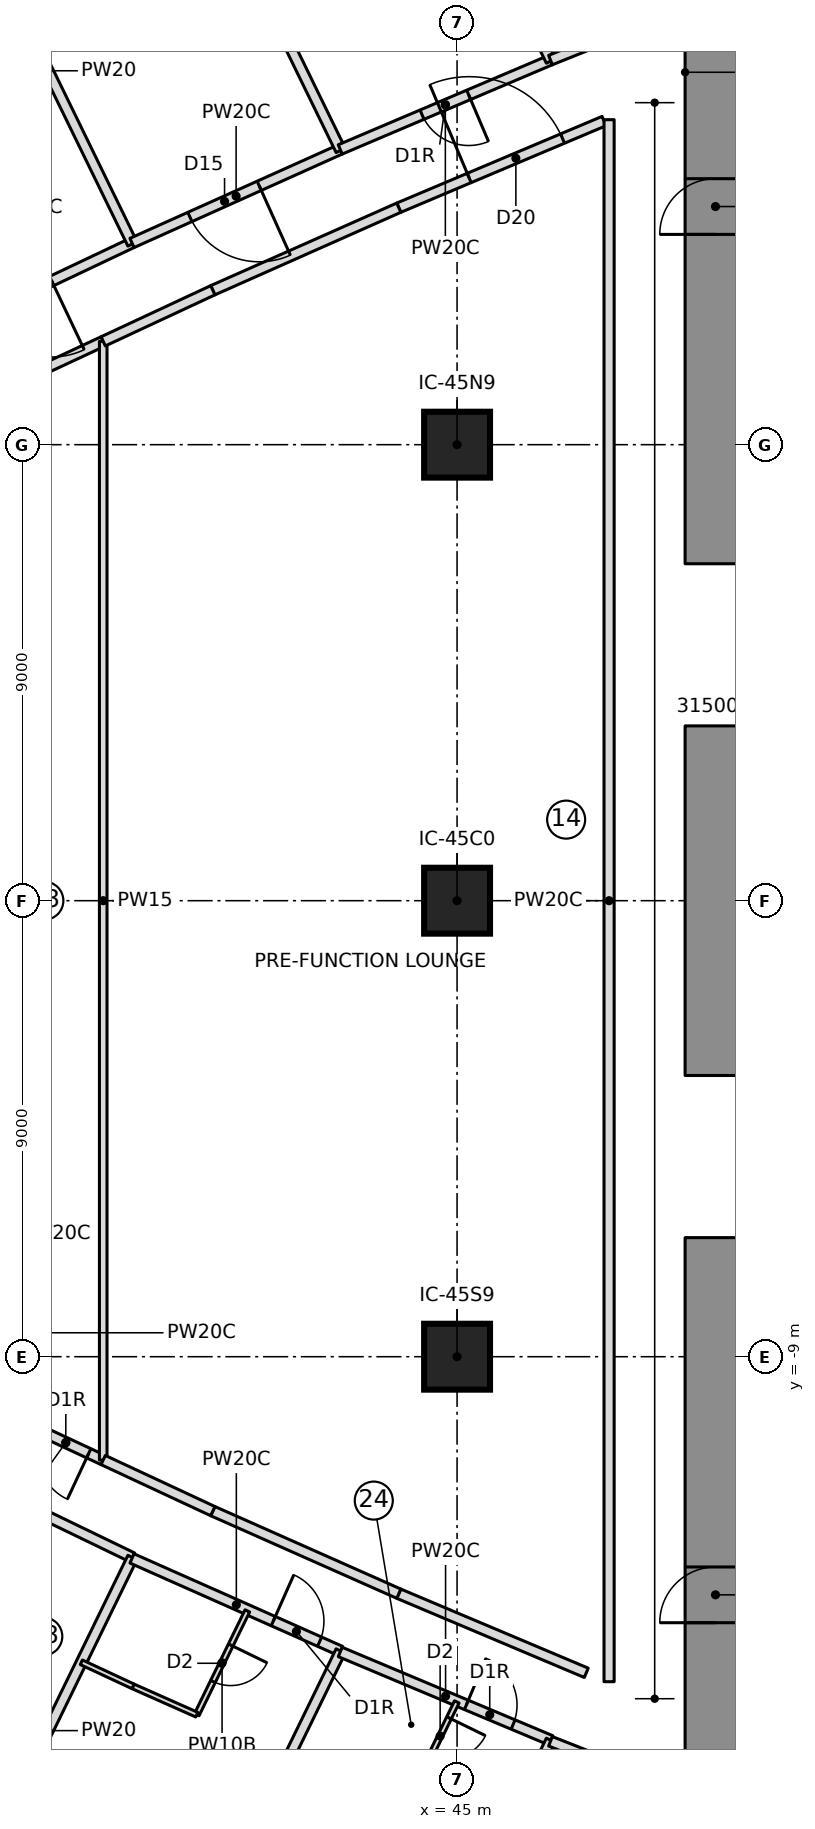
"""IFC4 building model, lengths in metres.
Left out: names, types, materials, properties, quantities, classifications, styles, units other than length and angle.
Written with IfcOpenShell. Run it as: python <this file> out.ifc"""

import sys

from ifc_helpers import new_model, si_unit, direction, frame, frame_2d, origin, origin_2d, place, context, subcontext, project, spatial, rectangle, extrude, element, fill, save


model = new_model("IFC4")
c1 = context("Model", 3, precision=1e-05, world=origin(), true_north=direction((0.0, 1.0)))
c2 = subcontext(c1, "Body", "Model", "MODEL_VIEW")
j1 = project(units=[si_unit("LENGTHUNIT", "METRE"), si_unit("PLANEANGLEUNIT", "RADIAN")], contexts=[c1])
p1 = place(None, origin())
s1 = spatial("IfcSite", under=j1, at=p1, CompositionType="ELEMENT")
p2 = place(p1, origin())
s2 = spatial("IfcBuilding", under=s1, at=p2, CompositionType="ELEMENT")
p3 = place(p2, frame((0.0, 0.0, 46.7)))
s3 = spatial("IfcBuildingStorey", under=s2, at=p3, CompositionType="ELEMENT", Elevation=46.7)
p4 = place(p3, frame((50.1, 6.65, 0.0), z_axis=(0.0, 0.0, 1.0), x_axis=(0.0, 1.0, 0.0)))
e1 = element("IfcWall", 1, at=p4, inside=s3, PredefinedType="SHEAR", context=c2, shape_type="SweptSolid", body=[
    extrude(rectangle(XDim=10.3, YDim=1.2, at=frame_2d((5.15, 0.0))), origin(), (0.0, 0.0, 1.0), 3.55),
])
p5 = place(p4, frame((6.5, 0.0, 0.0)))
e2 = element("IfcOpeningElement", 2, at=p5, cuts=e1, PredefinedType="OPENING", context=c2, shape_type="SweptSolid", body=[
    extrude(rectangle(XDim=1.1, YDim=2.1, at=frame_2d((0.55, 1.05))), frame((0.0, 0.61, 0.0), z_axis=(0.0, -1.0, 0.0), x_axis=(1.0, 0.0, 0.0)), (0.0, 0.0, 1.0), 1.22),
])
p6 = place(p3, frame((50.1, -3.45, 0.0), z_axis=(0.0, 0.0, 1.0), x_axis=(0.0, 1.0, 0.0)))
e3 = element("IfcWall", 3, at=p6, inside=s3, PredefinedType="SHEAR", context=c2, shape_type="SweptSolid", body=[
    extrude(rectangle(XDim=6.9, YDim=1.2, at=frame_2d((3.45, 0.0))), origin(), (0.0, 0.0, 1.0), 3.55),
])
p7 = place(p3, frame((50.1, -16.95, 0.0), z_axis=(0.0, 0.0, 1.0), x_axis=(0.0, 1.0, 0.0)))
e4 = element("IfcWall", 4, at=p7, inside=s3, PredefinedType="SHEAR", context=c2, shape_type="SweptSolid", body=[
    extrude(rectangle(XDim=10.3, YDim=1.2, at=frame_2d((5.15, 0.0))), origin(), (0.0, 0.0, 1.0), 3.55),
])
p8 = place(p7, frame((2.7, 0.0, 0.0)))
e5 = element("IfcOpeningElement", 5, at=p8, cuts=e4, PredefinedType="OPENING", context=c2, shape_type="SweptSolid", body=[
    extrude(rectangle(XDim=1.1, YDim=2.1, at=frame_2d((0.55, 1.05))), frame((0.0, 0.61, 0.0), z_axis=(0.0, -1.0, 0.0), x_axis=(1.0, 0.0, 0.0)), (0.0, 0.0, 1.0), 1.22),
])
for number, where, z_axis, x_axis in (
    (6, (45.0, -9.0, 0.0), (0.0, 0.0, 1.0), (1.0, 0.0, 0.0)),
    (7, (45.0, 0.0, 0.0), (0.0, 0.0, 1.0), (1.0, 0.0, 0.0)),
    (8, (45.0, 9.0, 0.0), (0.0, 0.0, 1.0), (1.0, 0.0, 0.0)),
):
    element("IfcColumn", number, at=place(p3, frame(where, z_axis=z_axis, x_axis=x_axis)), inside=s3, PredefinedType="COLUMN", context=c2, shape_type="SweptSolid", body=[
        extrude(rectangle(XDim=1.3, YDim=1.3, at=origin_2d()), origin(), (0.0, 0.0, 1.0), 3.55),
    ])
p9 = place(p3, frame((38.585, 12.981, 0.0), z_axis=(0.0, 0.0, 1.0), x_axis=(-0.903706948966, -0.428151550727, 0.0)))
e9 = element("IfcWall", 9, at=p9, inside=s3, PredefinedType="PARTITIONING", context=c2, shape_type="SweptSolid", body=[
    extrude(rectangle(XDim=4.506, YDim=0.2, at=frame_2d((2.253, 0.0))), origin(), (0.0, 0.0, 1.0), 3.25),
])
p10 = place(p9, frame((1.753, 0.0, 0.0)))
e10 = element("IfcOpeningElement", 10, at=p10, cuts=e9, PredefinedType="OPENING", context=c2, shape_type="SweptSolid", body=[
    extrude(rectangle(XDim=1.5, YDim=2.1, at=frame_2d((0.75, 1.05))), frame((0.0, 0.11, 0.0), z_axis=(0.0, -1.0, 0.0), x_axis=(1.0, 0.0, 0.0)), (0.0, 0.0, 1.0), 0.22),
])
p11 = place(p3, frame((38.594, 12.963, 0.0), z_axis=(0.0, 0.0, 1.0), x_axis=(-0.438197705697, 0.898878618459, 0.0)))
e11 = element("IfcWall", 11, at=p11, inside=s3, PredefinedType="PARTITIONING", context=c2, shape_type="SweptSolid", body=[
    extrude(rectangle(XDim=7.601, YDim=0.2, at=frame_2d((3.801, 0.0))), origin(), (0.0, 0.0, 1.0), 3.25),
])
p12 = place(p3, frame((42.694, 14.827, 0.0), z_axis=(0.0, 0.0, 1.0), x_axis=(-0.912193063794, -0.409760679381, 0.0)))
e12 = element("IfcWall", 12, at=p12, inside=s3, PredefinedType="PARTITIONING", context=c2, shape_type="SweptSolid", body=[
    extrude(rectangle(XDim=4.505, YDim=0.2, at=frame_2d((2.252, 0.0))), origin(), (0.0, 0.0, 1.0), 3.25),
])
p13 = place(p12, frame((1.752, 0.0, 0.0)))
e13 = element("IfcOpeningElement", 13, at=p13, cuts=e12, PredefinedType="OPENING", context=c2, shape_type="SweptSolid", body=[
    extrude(rectangle(XDim=1.5, YDim=2.1, at=frame_2d((0.75, 1.05))), frame((0.0, 0.11, 0.0), z_axis=(0.0, -1.0, 0.0), x_axis=(1.0, 0.0, 0.0)), (0.0, 0.0, 1.0), 0.22),
])
p14 = place(p3, frame((42.703, 14.809, 0.0), z_axis=(0.0, 0.0, 1.0), x_axis=(-0.438202247191, 0.898876404494, 0.0)))
e14 = element("IfcWall", 14, at=p14, inside=s3, PredefinedType="PARTITIONING", context=c2, shape_type="SweptSolid", body=[
    extrude(rectangle(XDim=7.605, YDim=0.2, at=frame_2d((3.802, 0.0))), origin(), (0.0, 0.0, 1.0), 3.25),
])
p15 = place(p3, frame((46.844, 16.591, 0.0), z_axis=(0.0, 0.0, 1.0), x_axis=(-0.92031727314, -0.39117274542, 0.0)))
e15 = element("IfcWall", 15, at=p15, inside=s3, PredefinedType="PARTITIONING", context=c2, shape_type="SweptSolid", body=[
    extrude(rectangle(XDim=4.509, YDim=0.2, at=frame_2d((2.254, 0.0))), origin(), (0.0, 0.0, 1.0), 3.25),
])
p16 = place(p15, frame((1.754, 0.0, 0.0)))
e16 = element("IfcOpeningElement", 16, at=p16, cuts=e15, PredefinedType="OPENING", context=c2, shape_type="SweptSolid", body=[
    extrude(rectangle(XDim=1.0, YDim=2.1, at=frame_2d((0.5, 1.05))), frame((0.0, 0.11, 0.0), z_axis=(0.0, -1.0, 0.0), x_axis=(1.0, 0.0, 0.0)), (0.0, 0.0, 1.0), 0.22),
])
p17 = place(p3, frame((46.852, 16.573, 0.0), z_axis=(0.0, 0.0, 1.0), x_axis=(-0.438196739796, 0.898879089328, 0.0)))
e17 = element("IfcWall", 17, at=p17, inside=s3, PredefinedType="PARTITIONING", context=c2, shape_type="SweptSolid", body=[
    extrude(rectangle(XDim=7.611, YDim=0.2, at=frame_2d((3.806, 0.0))), origin(), (0.0, 0.0, 1.0), 3.25),
])
p18 = place(p3, frame((30.48, -9.04, 0.0), z_axis=(0.0, 0.0, 1.0), x_axis=(0.900265089934, -0.43534212735, 0.0)))
e18 = element("IfcWall", 18, at=p18, inside=s3, PredefinedType="PARTITIONING", context=c2, shape_type="SweptSolid", body=[
    extrude(rectangle(XDim=9.013, YDim=0.2, at=frame_2d((4.506, 0.0))), origin(), (0.0, 0.0, 1.0), 3.25),
])
p19 = place(p18, frame((3.9, 0.0, 0.0)))
e19 = element("IfcOpeningElement", 19, at=p19, cuts=e18, PredefinedType="OPENING", context=c2, shape_type="SweptSolid", body=[
    extrude(rectangle(XDim=1.0, YDim=2.1, at=frame_2d((0.5, 1.05))), frame((0.0, 0.11, 0.0), z_axis=(0.0, -1.0, 0.0), x_axis=(1.0, 0.0, 0.0)), (0.0, 0.0, 1.0), 0.22),
])
p20 = place(p3, frame((35.263, -19.796, 0.0), z_axis=(0.0, 0.0, 1.0), x_axis=(0.438197705697, 0.898878618459, 0.0)))
e20 = element("IfcWall", 20, at=p20, inside=s3, PredefinedType="PARTITIONING", context=c2, shape_type="SweptSolid", body=[
    extrude(rectangle(XDim=7.601, YDim=0.2, at=frame_2d((3.801, 0.0))), origin(), (0.0, 0.0, 1.0), 3.25),
])
p21 = place(p3, frame((38.585, -12.981, 0.0), z_axis=(0.0, 0.0, 1.0), x_axis=(0.914010307464, -0.40569096348, 0.0)))
e21 = element("IfcWall", 21, at=p21, inside=s3, PredefinedType="PARTITIONING", context=c2, shape_type="SweptSolid", body=[
    extrude(rectangle(XDim=4.506, YDim=0.2, at=frame_2d((2.253, 0.0))), origin(), (0.0, 0.0, 1.0), 3.25),
])
p22 = place(p21, frame((3.05, 0.0, 0.0)))
e22 = element("IfcOpeningElement", 22, at=p22, cuts=e21, PredefinedType="OPENING", context=c2, shape_type="SweptSolid", body=[
    extrude(rectangle(XDim=1.0, YDim=2.1, at=frame_2d((0.5, 1.05))), frame((0.0, 0.11, 0.0), z_axis=(0.0, -1.0, 0.0), x_axis=(1.0, 0.0, 0.0)), (0.0, 0.0, 1.0), 0.22),
])
p23 = place(p3, frame((40.861, -14.017, 0.0), z_axis=(0.0, 0.0, 1.0), x_axis=(-0.438233629628, -0.898861104878, 0.0)))
e23 = element("IfcWall", 23, at=p23, inside=s3, PredefinedType="PARTITIONING", context=c2, shape_type="SweptSolid", body=[
    extrude(rectangle(XDim=2.279, YDim=0.1, at=frame_2d((1.139, 0.0))), origin(), (0.0, 0.0, 1.0), 3.25),
])
p24 = place(p23, frame((0.75, 0.0, 0.0)))
e24 = element("IfcOpeningElement", 24, at=p24, cuts=e23, PredefinedType="OPENING", context=c2, shape_type="SweptSolid", body=[
    extrude(rectangle(XDim=0.8, YDim=2.1, at=frame_2d((0.4, 1.05))), frame((0.0, 0.06, 0.0), z_axis=(0.0, -1.0, 0.0), x_axis=(1.0, 0.0, 0.0)), (0.0, 0.0, 1.0), 0.12),
])
p25 = place(p3, frame((39.863, -16.065, 0.0), z_axis=(0.0, 0.0, 1.0), x_axis=(-0.913972512123, 0.405776104625, 0.0)))
e25 = element("IfcWall", 25, at=p25, inside=s3, PredefinedType="PARTITIONING", context=c2, shape_type="SweptSolid", body=[
    extrude(rectangle(XDim=1.375, YDim=0.1, at=frame_2d((0.688, 0.0))), origin(), (0.0, 0.0, 1.0), 3.25),
])
p26 = place(p3, frame((38.606, -15.507, 0.0), z_axis=(0.0, 0.0, 1.0), x_axis=(-0.90632717857, 0.422576673972, 0.0)))
e26 = element("IfcWall", 26, at=p26, inside=s3, PredefinedType="PARTITIONING", context=c2, shape_type="SweptSolid", body=[
    extrude(rectangle(XDim=1.125, YDim=0.1, at=frame_2d((0.563, 0.0))), origin(), (0.0, 0.0, 1.0), 3.25),
])
p27 = place(p3, frame((39.37, -21.645, 0.0), z_axis=(0.0, 0.0, 1.0), x_axis=(0.438202247191, 0.898876404494, 0.0)))
e27 = element("IfcWall", 27, at=p27, inside=s3, PredefinedType="PARTITIONING", context=c2, shape_type="SweptSolid", body=[
    extrude(rectangle(XDim=7.605, YDim=0.2, at=frame_2d((3.802, 0.0))), origin(), (0.0, 0.0, 1.0), 3.25),
])
p28 = place(p3, frame((42.694, -14.827, 0.0), z_axis=(0.0, 0.0, 1.0), x_axis=(0.922040468003, -0.38709349693, 0.0)))
e28 = element("IfcWall", 28, at=p28, inside=s3, PredefinedType="PARTITIONING", context=c2, shape_type="SweptSolid", body=[
    extrude(rectangle(XDim=4.51, YDim=0.2, at=frame_2d((2.255, 0.0))), origin(), (0.0, 0.0, 1.0), 3.25),
])
p29 = place(p28, frame((2.7, 0.0, 0.0)))
e29 = element("IfcOpeningElement", 29, at=p29, cuts=e28, PredefinedType="OPENING", context=c2, shape_type="SweptSolid", body=[
    extrude(rectangle(XDim=1.0, YDim=2.1, at=frame_2d((0.5, 1.05))), frame((0.0, 0.11, 0.0), z_axis=(0.0, -1.0, 0.0), x_axis=(1.0, 0.0, 0.0)), (0.0, 0.0, 1.0), 0.22),
])
p30 = place(p3, frame((44.994, -15.813, 0.0), z_axis=(0.0, 0.0, 1.0), x_axis=(-0.438197922062, -0.898878512982, 0.0)))
e30 = element("IfcWall", 30, at=p30, inside=s3, PredefinedType="PARTITIONING", context=c2, shape_type="SweptSolid", body=[
    extrude(rectangle(XDim=2.281, YDim=0.1, at=frame_2d((1.14, 0.0))), origin(), (0.0, 0.0, 1.0), 3.25),
])
p31 = place(p30, frame((0.35, 0.0, 0.0)))
e31 = element("IfcOpeningElement", 31, at=p31, cuts=e30, PredefinedType="OPENING", context=c2, shape_type="SweptSolid", body=[
    extrude(rectangle(XDim=0.8, YDim=2.1, at=frame_2d((0.4, 1.05))), frame((0.0, 0.06, 0.0), z_axis=(0.0, -1.0, 0.0), x_axis=(1.0, 0.0, 0.0)), (0.0, 0.0, 1.0), 0.12),
])
p32 = place(p3, frame((43.517, -23.414, 0.0), z_axis=(0.0, 0.0, 1.0), x_axis=(0.438196739796, 0.898879089328, 0.0)))
e32 = element("IfcWall", 32, at=p32, inside=s3, PredefinedType="PARTITIONING", context=c2, shape_type="SweptSolid", body=[
    extrude(rectangle(XDim=7.611, YDim=0.2, at=frame_2d((3.806, 0.0))), origin(), (0.0, 0.0, 1.0), 3.25),
])
p33 = place(p3, frame((38.017, -11.039, 0.0), z_axis=(0.0, 0.0, 1.0), x_axis=(-0.906378304335, 0.422467003955, 0.0)))
e33 = element("IfcWall", 33, at=p33, inside=s3, PredefinedType="PARTITIONING", context=c2, shape_type="SweptSolid", body=[
    extrude(rectangle(XDim=1.629, YDim=0.2, at=frame_2d((0.814, 0.0))), origin(), (0.0, 0.0, 1.0), 3.25),
])
p34 = place(p33, frame((0.315, 0.0, 0.0)))
e34 = element("IfcOpeningElement", 34, at=p34, cuts=e33, PredefinedType="OPENING", context=c2, shape_type="SweptSolid", body=[
    extrude(rectangle(XDim=1.0, YDim=2.1, at=frame_2d((0.5, 1.05))), frame((0.0, 0.11, 0.0), z_axis=(0.0, -1.0, 0.0), x_axis=(1.0, 0.0, 0.0)), (0.0, 0.0, 1.0), 0.22),
])
p35 = place(p3, frame((36.54, 10.351, 0.0), z_axis=(0.0, 0.0, 1.0), x_axis=(0.906378304335, 0.422467003955, 0.0)))
e35 = element("IfcWall", 35, at=p35, inside=s3, PredefinedType="PARTITIONING", context=c2, shape_type="SweptSolid", body=[
    extrude(rectangle(XDim=1.629, YDim=0.2, at=frame_2d((0.814, 0.0))), origin(), (0.0, 0.0, 1.0), 3.25),
])
p36 = place(p3, frame((38.017, -11.039, 0.0), z_axis=(0.0, 0.0, 1.0), x_axis=(0.0, 1.0, 0.0)))
e36 = element("IfcWall", 36, at=p36, inside=s3, PredefinedType="PARTITIONING", context=c2, shape_type="SweptSolid", body=[
    extrude(rectangle(XDim=22.079, YDim=0.15, at=frame_2d((11.039, 0.0))), origin(), (0.0, 0.0, 1.0), 3.25),
])
p37 = place(p3, frame((43.85, 13.677, 0.0), z_axis=(0.0, 0.0, 1.0), x_axis=(0.921265924084, 0.388933281068, 0.0)))
e37 = element("IfcWall", 37, at=p37, inside=s3, PredefinedType="PARTITIONING", context=c2, shape_type="SweptSolid", body=[
    extrude(rectangle(XDim=4.396, YDim=0.2, at=frame_2d((2.198, 0.0))), origin(), (0.0, 0.0, 1.0), 3.25),
])
p38 = place(p37, frame((1.508, 0.0, 0.0)))
e38 = element("IfcOpeningElement", 38, at=p38, cuts=e37, PredefinedType="OPENING", context=c2, shape_type="SweptSolid", body=[
    extrude(rectangle(XDim=2.0, YDim=2.4, at=frame_2d((1.0, 1.2))), frame((0.0, 0.11, 0.0), z_axis=(0.0, -1.0, 0.0), x_axis=(1.0, 0.0, 0.0)), (0.0, 0.0, 1.0), 0.22),
])
p39 = place(p3, frame((40.18, 12.048, 0.0), z_axis=(0.0, 0.0, 1.0), x_axis=(0.913986953061, 0.405743576209, 0.0)))
e39 = element("IfcWall", 39, at=p39, inside=s3, PredefinedType="PARTITIONING", context=c2, shape_type="SweptSolid", body=[
    extrude(rectangle(XDim=4.016, YDim=0.2, at=frame_2d((2.008, 0.0))), origin(), (0.0, 0.0, 1.0), 3.25),
])
p40 = place(p3, frame((47.55, -15.239, 0.0), z_axis=(0.0, 0.0, 1.0), x_axis=(-0.921269894054, 0.388923877269, 0.0)))
e40 = element("IfcWall", 40, at=p40, inside=s3, PredefinedType="PARTITIONING", context=c2, shape_type="SweptSolid", body=[
    extrude(rectangle(XDim=4.016, YDim=0.2, at=frame_2d((2.008, 0.0))), origin(), (0.0, 0.0, 1.0), 3.25),
])
p41 = place(p3, frame((43.85, -13.677, 0.0), z_axis=(0.0, 0.0, 1.0), x_axis=(-0.913986953061, 0.405743576209, 0.0)))
e41 = element("IfcWall", 41, at=p41, inside=s3, PredefinedType="PARTITIONING", context=c2, shape_type="SweptSolid", body=[
    extrude(rectangle(XDim=4.016, YDim=0.2, at=frame_2d((2.008, 0.0))), origin(), (0.0, 0.0, 1.0), 3.25),
])
for number, where, z_axis, x_axis in (
    (42, (40.18, -12.048, 0.0), (0.0, 0.0, 1.0), (-0.906, 0.423, 0.0)),
    (43, (38.017, 11.039, 0.0), (0.0, 0.0, 1.0), (0.906, 0.423, 0.0)),
):
    element("IfcWall", number, at=place(p3, frame(where, z_axis=z_axis, x_axis=x_axis)), inside=s3, PredefinedType="PARTITIONING", context=c2, shape_type="SweptSolid", body=[
        extrude(rectangle(XDim=2.387, YDim=0.2, at=frame_2d((1.193, 0.0))), origin(), (0.0, 0.0, 1.0), 3.25),
    ])
p42 = place(p3, frame((47.704, 16.936, 0.0), z_axis=(0.0, 0.0, 1.0), x_axis=(-0.927985537407, -0.372616213232, 0.0)))
e44 = element("IfcWall", 44, at=p42, inside=s3, PredefinedType="PARTITIONING", context=c2, shape_type="SweptSolid", body=[
    extrude(rectangle(XDim=0.927, YDim=0.2, at=frame_2d((0.463, 0.0))), origin(), (0.0, 0.0, 1.0), 3.25),
])
p43 = place(p3, frame((46.844, -16.591, 0.0), z_axis=(0.0, 0.0, 1.0), x_axis=(0.930610193452, -0.366011841125, 0.0)))
e45 = element("IfcWall", 45, at=p43, inside=s3, PredefinedType="PARTITIONING", context=c2, shape_type="SweptSolid", body=[
    extrude(rectangle(XDim=0.925, YDim=0.2, at=frame_2d((0.462, 0.0))), origin(), (0.0, 0.0, 1.0), 3.25),
])
p44 = place(p3, frame((48.0, 15.414, 0.0), z_axis=(0.0, 0.0, 1.0), x_axis=(0.0, -1.0, 0.0)))
e46 = element("IfcWall", 46, at=p44, inside=s3, PredefinedType="PARTITIONING", context=c2, shape_type="SweptSolid", body=[
    extrude(rectangle(XDim=30.828, YDim=0.2, at=frame_2d((15.414, 0.0))), origin(), (0.0, 0.0, 1.0), 3.25),
])
p45 = place(p13, origin())
e47 = element("IfcDoor", 47, at=p45, inside=s3, OperationType="DOUBLE_DOOR_SINGLE_SWING", PredefinedType="DOOR", context=c2, shape_type="SweptSolid", body=[
    extrude(rectangle(XDim=1.5, YDim=2.1, at=frame_2d((0.75, 1.05))), frame((0.0, 0.025, 0.0), z_axis=(0.0, -1.0, 0.0), x_axis=(1.0, 0.0, 0.0)), (0.0, 0.0, 1.0), 0.05),
])
fill(e13, e47)
p46 = place(p16, origin())
e48 = element("IfcDoor", 48, at=p46, inside=s3, OperationType="SINGLE_SWING_RIGHT", PredefinedType="DOOR", context=c2, shape_type="SweptSolid", body=[
    extrude(rectangle(XDim=1.0, YDim=2.1, at=frame_2d((0.5, 1.05))), frame((0.0, 0.025, 0.0), z_axis=(0.0, -1.0, 0.0), x_axis=(1.0, 0.0, 0.0)), (0.0, 0.0, 1.0), 0.05),
])
fill(e16, e48)
p47 = place(p24, origin())
e49 = element("IfcDoor", 49, at=p47, inside=s3, OperationType="SINGLE_SWING_LEFT", PredefinedType="DOOR", context=c2, shape_type="SweptSolid", body=[
    extrude(rectangle(XDim=0.8, YDim=2.1, at=frame_2d((0.4, 1.05))), frame((0.0, 0.025, 0.0), z_axis=(0.0, -1.0, 0.0), x_axis=(1.0, 0.0, 0.0)), (0.0, 0.0, 1.0), 0.05),
])
fill(e24, e49)
p48 = place(p22, origin())
e50 = element("IfcDoor", 50, at=p48, inside=s3, OperationType="SINGLE_SWING_RIGHT", PredefinedType="DOOR", context=c2, shape_type="SweptSolid", body=[
    extrude(rectangle(XDim=1.0, YDim=2.1, at=frame_2d((0.5, 1.05))), frame((0.0, 0.025, 0.0), z_axis=(0.0, -1.0, 0.0), x_axis=(1.0, 0.0, 0.0)), (0.0, 0.0, 1.0), 0.05),
])
fill(e22, e50)
p49 = place(p31, origin())
e51 = element("IfcDoor", 51, at=p49, inside=s3, OperationType="SINGLE_SWING_LEFT", PredefinedType="DOOR", context=c2, shape_type="SweptSolid", body=[
    extrude(rectangle(XDim=0.8, YDim=2.1, at=frame_2d((0.4, 1.05))), frame((0.0, 0.025, 0.0), z_axis=(0.0, -1.0, 0.0), x_axis=(1.0, 0.0, 0.0)), (0.0, 0.0, 1.0), 0.05),
])
fill(e31, e51)
p50 = place(p29, origin())
e52 = element("IfcDoor", 52, at=p50, inside=s3, OperationType="SINGLE_SWING_RIGHT", PredefinedType="DOOR", context=c2, shape_type="SweptSolid", body=[
    extrude(rectangle(XDim=1.0, YDim=2.1, at=frame_2d((0.5, 1.05))), frame((0.0, 0.025, 0.0), z_axis=(0.0, -1.0, 0.0), x_axis=(1.0, 0.0, 0.0)), (0.0, 0.0, 1.0), 0.05),
])
fill(e29, e52)
p51 = place(p34, origin())
e53 = element("IfcDoor", 53, at=p51, inside=s3, OperationType="SINGLE_SWING_RIGHT", PredefinedType="DOOR", context=c2, shape_type="SweptSolid", body=[
    extrude(rectangle(XDim=1.0, YDim=2.1, at=frame_2d((0.5, 1.05))), frame((0.0, 0.025, 0.0), z_axis=(0.0, -1.0, 0.0), x_axis=(1.0, 0.0, 0.0)), (0.0, 0.0, 1.0), 0.05),
])
fill(e34, e53)
p52 = place(p38, origin())
e54 = element("IfcDoor", 54, at=p52, inside=s3, OperationType="DOUBLE_DOOR_SINGLE_SWING", PredefinedType="DOOR", context=c2, shape_type="SweptSolid", body=[
    extrude(rectangle(XDim=2.0, YDim=2.4, at=frame_2d((1.0, 1.2))), frame((0.0, 0.025, 0.0), z_axis=(0.0, -1.0, 0.0), x_axis=(1.0, 0.0, 0.0)), (0.0, 0.0, 1.0), 0.05),
])
fill(e38, e54)
p53 = place(p5, origin())
e55 = element("IfcDoor", 55, at=p53, inside=s3, OperationType="SINGLE_SWING_RIGHT", PredefinedType="DOOR", context=c2, shape_type="SweptSolid", body=[
    extrude(rectangle(XDim=1.1, YDim=2.1, at=frame_2d((0.55, 1.05))), frame((0.0, 0.025, 0.0), z_axis=(0.0, -1.0, 0.0), x_axis=(1.0, 0.0, 0.0)), (0.0, 0.0, 1.0), 0.05),
])
fill(e2, e55)
p54 = place(p8, origin())
e56 = element("IfcDoor", 56, at=p54, inside=s3, OperationType="SINGLE_SWING_RIGHT", PredefinedType="DOOR", context=c2, shape_type="SweptSolid", body=[
    extrude(rectangle(XDim=1.1, YDim=2.1, at=frame_2d((0.55, 1.05))), frame((0.0, 0.025, 0.0), z_axis=(0.0, -1.0, 0.0), x_axis=(1.0, 0.0, 0.0)), (0.0, 0.0, 1.0), 0.05),
])
fill(e5, e56)
save(model, sys.argv[1])
